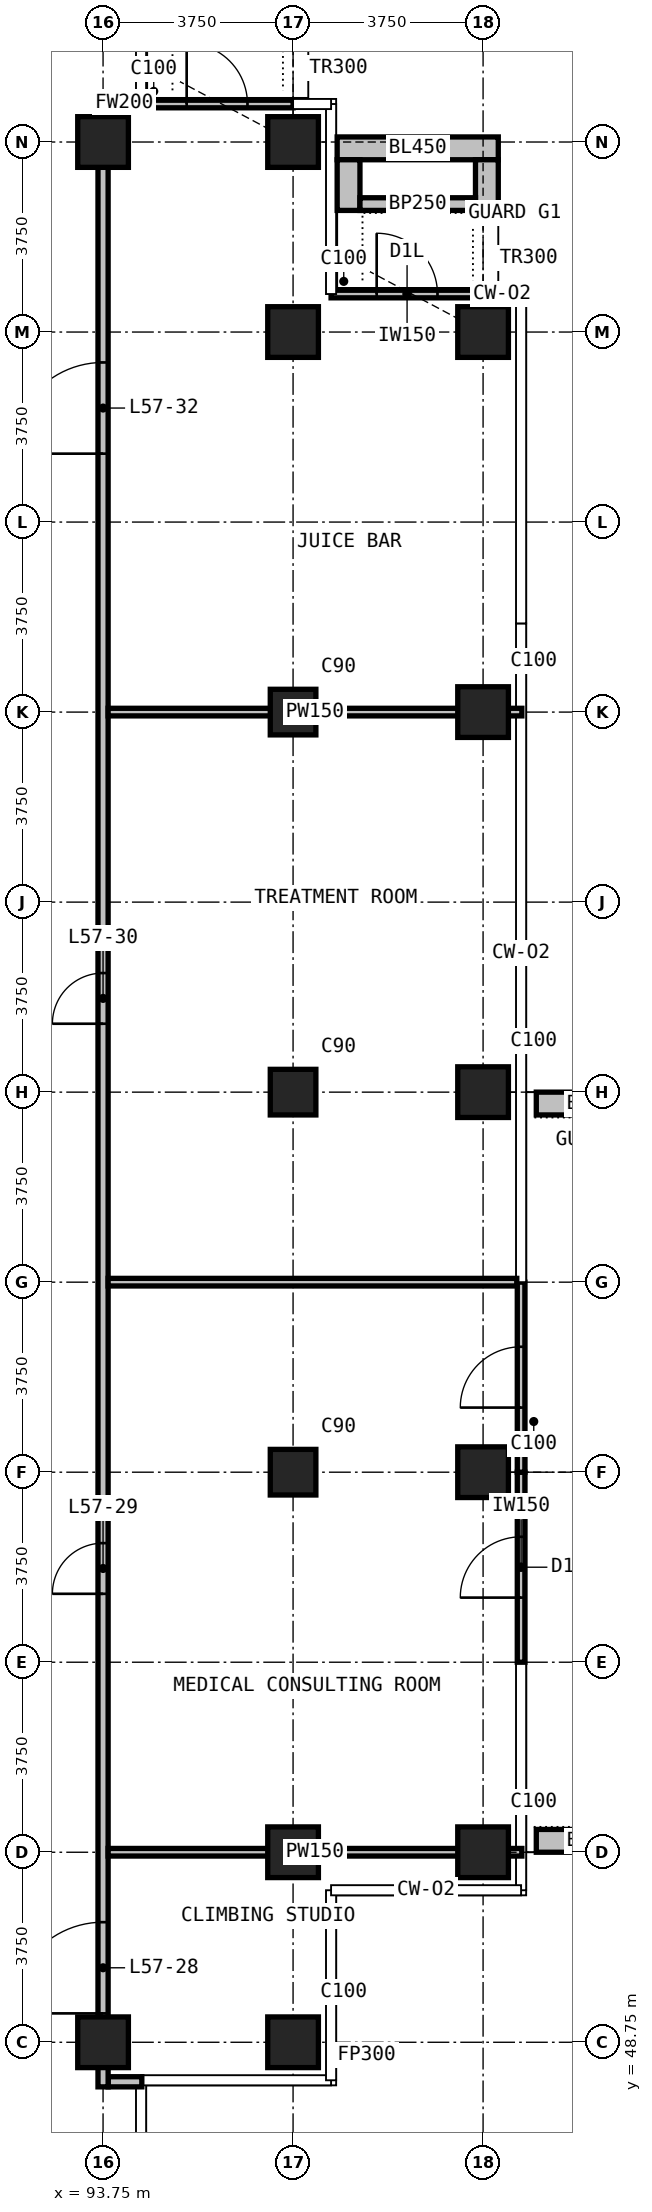
"""IFC4 building model, lengths in metres.
Left out: names, types, materials, properties, quantities, classifications, styles, units other than length and angle.
Written with IfcOpenShell. Run it as: python <this file> out.ifc"""

import sys

from ifc_helpers import new_model, si_unit, direction, frame, frame_2d, origin, origin_2d, place, context, subcontext, project, spatial, rectangle, extrude, element, fill, save


model = new_model("IFC4")
c1 = context("Model", 3, precision=1e-05, world=origin(), true_north=direction((0.0, 1.0)))
c2 = subcontext(c1, "Body", "Model", "MODEL_VIEW")
j1 = project(units=[si_unit("LENGTHUNIT", "METRE"), si_unit("PLANEANGLEUNIT", "RADIAN")], contexts=[c1])
p1 = place(None, origin())
s1 = spatial("IfcSite", under=j1, at=p1, CompositionType="ELEMENT")
p2 = place(p1, origin())
s2 = spatial("IfcBuilding", under=s1, at=p2, CompositionType="ELEMENT")
p3 = place(p2, frame((0.0, 0.0, 221.1)))
s3 = spatial("IfcBuildingStorey", under=s2, at=p3, CompositionType="ELEMENT", Elevation=221.1)
for number, where, z_axis, x_axis in (
    (1, (93.75, 48.75, 0.0), (0.0, 0.0, 1.0), (1.0, 0.0, 0.0)),
    (2, (93.75, 86.25, 0.0), (0.0, 0.0, 1.0), (1.0, 0.0, 0.0)),
    (3, (97.5, 48.75, 0.0), (0.0, 0.0, 1.0), (1.0, 0.0, 0.0)),
    (4, (97.5, 52.5, 0.0), (0.0, 0.0, 1.0), (1.0, 0.0, 0.0)),
):
    element("IfcColumn", number, at=place(p3, frame(where, z_axis=z_axis, x_axis=x_axis)), inside=s3, PredefinedType="COLUMN", context=c2, shape_type="SweptSolid", body=[
        extrude(rectangle(XDim=1.0, YDim=1.0, at=origin_2d()), origin(), (0.0, 0.0, 1.0), 3.6),
    ])
for number, where, z_axis, x_axis in (
    (5, (97.5, 60.0, 0.0), (0.0, 0.0, 1.0), (1.0, 0.0, 0.0)),
    (6, (97.5, 67.5, 0.0), (0.0, 0.0, 1.0), (1.0, 0.0, 0.0)),
    (7, (97.5, 75.0, 0.0), (0.0, 0.0, 1.0), (1.0, 0.0, 0.0)),
):
    element("IfcColumn", number, at=place(p3, frame(where, z_axis=z_axis, x_axis=x_axis)), inside=s3, PredefinedType="COLUMN", context=c2, shape_type="SweptSolid", body=[
        extrude(rectangle(XDim=0.9, YDim=0.9, at=origin_2d()), origin(), (0.0, 0.0, 1.0), 3.6),
    ])
for number, where, z_axis, x_axis in (
    (8, (97.5, 82.5, 0.0), (0.0, 0.0, 1.0), (1.0, 0.0, 0.0)),
    (9, (97.5, 86.25, 0.0), (0.0, 0.0, 1.0), (1.0, 0.0, 0.0)),
    (10, (101.25, 52.5, 0.0), (0.0, 0.0, 1.0), (1.0, 0.0, 0.0)),
    (11, (101.25, 60.0, 0.0), (0.0, 0.0, 1.0), (1.0, 0.0, 0.0)),
    (12, (101.25, 67.5, 0.0), (0.0, 0.0, 1.0), (1.0, 0.0, 0.0)),
    (13, (101.25, 75.0, 0.0), (0.0, 0.0, 1.0), (1.0, 0.0, 0.0)),
    (14, (101.25, 82.5, 0.0), (0.0, 0.0, 1.0), (1.0, 0.0, 0.0)),
):
    element("IfcColumn", number, at=place(p3, frame(where, z_axis=z_axis, x_axis=x_axis)), inside=s3, PredefinedType="COLUMN", context=c2, shape_type="SweptSolid", body=[
        extrude(rectangle(XDim=1.0, YDim=1.0, at=origin_2d()), origin(), (0.0, 0.0, 1.0), 3.6),
    ])
p4 = place(p3, frame((102.0, 56.25, 0.0), z_axis=(0.0, 0.0, 1.0), x_axis=(0.0, 1.0, 0.0)))
e15 = element("IfcWall", 15, at=p4, inside=s3, PredefinedType="SOLIDWALL", context=c2, shape_type="SweptSolid", body=[
    extrude(rectangle(XDim=3.75, YDim=0.15, at=frame_2d((1.875, 0.0))), origin(), (0.0, 0.0, 1.0), 3.3),
])
p5 = place(p4, frame((1.275, 0.0, 0.0)))
e16 = element("IfcOpeningElement", 16, at=p5, cuts=e15, PredefinedType="OPENING", context=c2, shape_type="SweptSolid", body=[
    extrude(rectangle(XDim=1.2, YDim=2.4, at=frame_2d((0.6, 1.2))), frame((0.0, 0.085, 0.0), z_axis=(0.0, -1.0, 0.0), x_axis=(1.0, 0.0, 0.0)), (0.0, 0.0, 1.0), 0.17),
])
p6 = place(p3, frame((102.0, 60.0, 0.0), z_axis=(0.0, 0.0, 1.0), x_axis=(0.0, 1.0, 0.0)))
e17 = element("IfcWall", 17, at=p6, inside=s3, PredefinedType="SOLIDWALL", context=c2, shape_type="SweptSolid", body=[
    extrude(rectangle(XDim=3.75, YDim=0.15, at=frame_2d((1.875, 0.0))), origin(), (0.0, 0.0, 1.0), 3.3),
])
p7 = place(p6, frame((1.275, 0.0, 0.0)))
e18 = element("IfcOpeningElement", 18, at=p7, cuts=e17, PredefinedType="OPENING", context=c2, shape_type="SweptSolid", body=[
    extrude(rectangle(XDim=1.2, YDim=2.4, at=frame_2d((0.6, 1.2))), frame((0.0, 0.085, 0.0), z_axis=(0.0, -1.0, 0.0), x_axis=(1.0, 0.0, 0.0)), (0.0, 0.0, 1.0), 0.17),
])
p8 = place(p3, frame((98.25, 83.25, 0.0), z_axis=(0.0, 0.0, 1.0), x_axis=(1.0, 0.0, 0.0)))
e19 = element("IfcWall", 19, at=p8, inside=s3, PredefinedType="SOLIDWALL", context=c2, shape_type="SweptSolid", body=[
    extrude(rectangle(XDim=3.0, YDim=0.15, at=frame_2d((1.5, 0.0))), origin(), (0.0, 0.0, 1.0), 3.3),
])
p9 = place(p8, frame((0.9, 0.0, 0.0)))
e20 = element("IfcOpeningElement", 20, at=p9, cuts=e19, PredefinedType="OPENING", context=c2, shape_type="SweptSolid", body=[
    extrude(rectangle(XDim=1.2, YDim=2.0, at=frame_2d((0.6, 1.0))), frame((0.0, 0.085, 0.0), z_axis=(0.0, -1.0, 0.0), x_axis=(1.0, 0.0, 0.0)), (0.0, 0.0, 1.0), 0.17),
])
p10 = place(p3, frame((94.5, 87.0, 0.0), z_axis=(0.0, 0.0, 1.0), x_axis=(1.0, 0.0, 0.0)))
e21 = element("IfcWall", 21, at=p10, inside=s3, PredefinedType="SOLIDWALL", context=c2, shape_type="SweptSolid", body=[
    extrude(rectangle(XDim=3.0, YDim=0.15, at=frame_2d((1.5, 0.0))), origin(), (0.0, 0.0, 1.0), 3.3),
])
p11 = place(p10, frame((0.9, 0.0, 0.0)))
e22 = element("IfcOpeningElement", 22, at=p11, cuts=e21, PredefinedType="OPENING", context=c2, shape_type="SweptSolid", body=[
    extrude(rectangle(XDim=1.2, YDim=2.0, at=frame_2d((0.6, 1.0))), frame((0.0, 0.085, 0.0), z_axis=(0.0, -1.0, 0.0), x_axis=(1.0, 0.0, 0.0)), (0.0, 0.0, 1.0), 0.17),
])
for number, where, z_axis, x_axis in (
    (23, (102.3, 52.725, 0.0), (0.0, 0.0, 1.0), (1.0, 0.0, 0.0)),
    (24, (102.3, 67.275, 0.0), (0.0, 0.0, 1.0), (1.0, 0.0, 0.0)),
):
    element("IfcWall", number, at=place(p3, frame(where, z_axis=z_axis, x_axis=x_axis)), inside=s3, PredefinedType="USERDEFINED", context=c2, shape_type="SweptSolid", body=[
        extrude(rectangle(XDim=2.35, YDim=0.45, at=frame_2d((1.175, 0.0))), origin(), (0.0, 0.0, 1.0), 1.1),
    ])
p12 = place(p3, frame((98.37, 86.125, 0.0), z_axis=(0.0, 0.0, 1.0), x_axis=(1.0, 0.0, 0.0)))
e25 = element("IfcWall", 25, at=p12, inside=s3, PredefinedType="USERDEFINED", context=c2, shape_type="SweptSolid", body=[
    extrude(rectangle(XDim=3.18, YDim=0.45, at=frame_2d((1.59, 0.0))), origin(), (0.0, 0.0, 1.0), 1.1),
])
for number, where, z_axis, x_axis in (
    (26, (98.595, 84.9, 0.0), (0.0, 0.0, 1.0), (0.0, 1.0, 0.0)),
    (27, (101.325, 84.9, 0.0), (0.0, 0.0, 1.0), (0.0, 1.0, 0.0)),
):
    element("IfcWall", number, at=place(p3, frame(where, z_axis=z_axis, x_axis=x_axis)), inside=s3, PredefinedType="USERDEFINED", context=c2, shape_type="SweptSolid", body=[
        extrude(rectangle(XDim=1.0, YDim=0.45, at=frame_2d((0.5, 0.0))), origin(), (0.0, 0.0, 1.0), 1.1),
    ])
p13 = place(p3, frame((98.82, 85.025, 0.0), z_axis=(0.0, 0.0, 1.0), x_axis=(1.0, 0.0, 0.0)))
e28 = element("IfcWall", 28, at=p13, inside=s3, PredefinedType="USERDEFINED", context=c2, shape_type="SweptSolid", body=[
    extrude(rectangle(XDim=2.28, YDim=0.25, at=frame_2d((1.14, 0.0))), origin(), (0.0, 0.0, 1.0), 1.0),
])
p14 = place(p3, frame((93.85, 47.97, 0.0), z_axis=(0.0, 0.0, 1.0), x_axis=(1.0, 0.0, 0.0)))
e29 = element("IfcWall", 29, at=p14, inside=s3, PredefinedType="PARTITIONING", context=c2, shape_type="SweptSolid", body=[
    extrude(rectangle(XDim=0.665, YDim=0.2, at=frame_2d((0.333, 0.0))), origin(), (0.0, 0.0, 1.0), 3.3),
])
p15 = place(p3, frame((93.85, 87.03, 0.0), z_axis=(0.0, 0.0, 1.0), x_axis=(1.0, 0.0, 0.0)))
e30 = element("IfcWall", 30, at=p15, inside=s3, PredefinedType="PARTITIONING", context=c2, shape_type="SweptSolid", body=[
    extrude(rectangle(XDim=0.64, YDim=0.2, at=frame_2d((0.32, 0.0))), origin(), (0.0, 0.0, 1.0), 3.3),
])
p16 = place(p3, frame((93.75, 47.87, 0.0), z_axis=(0.0, 0.0, 1.0), x_axis=(0.0, 1.0, 0.0)))
e31 = element("IfcWall", 31, at=p16, inside=s3, PredefinedType="PARTITIONING", context=c2, shape_type="SweptSolid", body=[
    extrude(rectangle(XDim=39.26, YDim=0.2, at=frame_2d((19.63, 0.0))), origin(), (0.0, 0.0, 1.0), 3.3),
])
p17 = place(p16, frame((1.45, 0.0, 0.0)))
e32 = element("IfcOpeningElement", 32, at=p17, cuts=e31, PredefinedType="OPENING", context=c2, shape_type="SweptSolid", body=[
    extrude(rectangle(XDim=1.8, YDim=2.2, at=frame_2d((0.9, 1.1))), frame((0.0, 0.11, 0.0), z_axis=(0.0, -1.0, 0.0), x_axis=(1.0, 0.0, 0.0)), (0.0, 0.0, 1.0), 0.22),
])
p18 = place(p16, frame((9.73, 0.0, 0.0)))
e33 = element("IfcOpeningElement", 33, at=p18, cuts=e31, PredefinedType="OPENING", context=c2, shape_type="SweptSolid", body=[
    extrude(rectangle(XDim=1.0, YDim=2.2, at=frame_2d((0.5, 1.1))), frame((0.0, 0.11, 0.0), z_axis=(0.0, -1.0, 0.0), x_axis=(1.0, 0.0, 0.0)), (0.0, 0.0, 1.0), 0.22),
])
p19 = place(p16, frame((20.98, 0.0, 0.0)))
e34 = element("IfcOpeningElement", 34, at=p19, cuts=e31, PredefinedType="OPENING", context=c2, shape_type="SweptSolid", body=[
    extrude(rectangle(XDim=1.0, YDim=2.2, at=frame_2d((0.5, 1.1))), frame((0.0, 0.11, 0.0), z_axis=(0.0, -1.0, 0.0), x_axis=(1.0, 0.0, 0.0)), (0.0, 0.0, 1.0), 0.22),
])
p20 = place(p16, frame((32.23, 0.0, 0.0)))
e35 = element("IfcOpeningElement", 35, at=p20, cuts=e31, PredefinedType="OPENING", context=c2, shape_type="SweptSolid", body=[
    extrude(rectangle(XDim=1.8, YDim=2.2, at=frame_2d((0.9, 1.1))), frame((0.0, 0.11, 0.0), z_axis=(0.0, -1.0, 0.0), x_axis=(1.0, 0.0, 0.0)), (0.0, 0.0, 1.0), 0.22),
])
p21 = place(p3, frame((93.85, 52.5, 0.0), z_axis=(0.0, 0.0, 1.0), x_axis=(1.0, 0.0, 0.0)))
e36 = element("IfcWall", 36, at=p21, inside=s3, PredefinedType="PARTITIONING", context=c2, shape_type="SweptSolid", body=[
    extrude(rectangle(XDim=8.165, YDim=0.15, at=frame_2d((4.083, 0.0))), origin(), (0.0, 0.0, 1.0), 3.3),
])
p22 = place(p3, frame((93.85, 63.75, 0.0), z_axis=(0.0, 0.0, 1.0), x_axis=(1.0, 0.0, 0.0)))
e37 = element("IfcWall", 37, at=p22, inside=s3, PredefinedType="PARTITIONING", context=c2, shape_type="SweptSolid", body=[
    extrude(rectangle(XDim=8.065, YDim=0.15, at=frame_2d((4.032, 0.0))), origin(), (0.0, 0.0, 1.0), 3.3),
])
p23 = place(p3, frame((93.85, 75.0, 0.0), z_axis=(0.0, 0.0, 1.0), x_axis=(1.0, 0.0, 0.0)))
e38 = element("IfcWall", 38, at=p23, inside=s3, PredefinedType="PARTITIONING", context=c2, shape_type="SweptSolid", body=[
    extrude(rectangle(XDim=8.165, YDim=0.15, at=frame_2d((4.083, 0.0))), origin(), (0.0, 0.0, 1.0), 3.3),
])
p24 = place(p5, origin())
e39 = element("IfcDoor", 39, at=p24, inside=s3, OperationType="SINGLE_SWING_LEFT", PredefinedType="DOOR", context=c2, shape_type="SweptSolid", body=[
    extrude(rectangle(XDim=1.2, YDim=2.4, at=frame_2d((0.6, 1.2))), frame((0.0, 0.025, 0.0), z_axis=(0.0, -1.0, 0.0), x_axis=(1.0, 0.0, 0.0)), (0.0, 0.0, 1.0), 0.05),
])
fill(e16, e39)
p25 = place(p7, origin())
e40 = element("IfcDoor", 40, at=p25, inside=s3, OperationType="SINGLE_SWING_LEFT", PredefinedType="DOOR", context=c2, shape_type="SweptSolid", body=[
    extrude(rectangle(XDim=1.2, YDim=2.4, at=frame_2d((0.6, 1.2))), frame((0.0, 0.025, 0.0), z_axis=(0.0, -1.0, 0.0), x_axis=(1.0, 0.0, 0.0)), (0.0, 0.0, 1.0), 0.05),
])
fill(e18, e40)
p26 = place(p9, origin())
e41 = element("IfcDoor", 41, at=p26, inside=s3, OperationType="SINGLE_SWING_LEFT", PredefinedType="DOOR", context=c2, shape_type="SweptSolid", body=[
    extrude(rectangle(XDim=1.2, YDim=2.0, at=frame_2d((0.6, 1.0))), frame((0.0, 0.025, 0.0), z_axis=(0.0, -1.0, 0.0), x_axis=(1.0, 0.0, 0.0)), (0.0, 0.0, 1.0), 0.05),
])
fill(e20, e41)
p27 = place(p11, origin())
e42 = element("IfcDoor", 42, at=p27, inside=s3, OperationType="SINGLE_SWING_LEFT", PredefinedType="DOOR", context=c2, shape_type="SweptSolid", body=[
    extrude(rectangle(XDim=1.2, YDim=2.0, at=frame_2d((0.6, 1.0))), frame((0.0, 0.025, 0.0), z_axis=(0.0, -1.0, 0.0), x_axis=(1.0, 0.0, 0.0)), (0.0, 0.0, 1.0), 0.05),
])
fill(e22, e42)
p28 = place(p17, origin())
e43 = element("IfcDoor", 43, at=p28, inside=s3, OperationType="DOUBLE_DOOR_SINGLE_SWING", PredefinedType="DOOR", context=c2, shape_type="SweptSolid", body=[
    extrude(rectangle(XDim=1.8, YDim=2.2, at=frame_2d((0.9, 1.1))), frame((0.0, 0.025, 0.0), z_axis=(0.0, -1.0, 0.0), x_axis=(1.0, 0.0, 0.0)), (0.0, 0.0, 1.0), 0.05),
])
fill(e32, e43)
p29 = place(p18, origin())
e44 = element("IfcDoor", 44, at=p29, inside=s3, OperationType="SINGLE_SWING_RIGHT", PredefinedType="DOOR", context=c2, shape_type="SweptSolid", body=[
    extrude(rectangle(XDim=1.0, YDim=2.2, at=frame_2d((0.5, 1.1))), frame((0.0, 0.025, 0.0), z_axis=(0.0, -1.0, 0.0), x_axis=(1.0, 0.0, 0.0)), (0.0, 0.0, 1.0), 0.05),
])
fill(e33, e44)
p30 = place(p19, origin())
e45 = element("IfcDoor", 45, at=p30, inside=s3, OperationType="SINGLE_SWING_RIGHT", PredefinedType="DOOR", context=c2, shape_type="SweptSolid", body=[
    extrude(rectangle(XDim=1.0, YDim=2.2, at=frame_2d((0.5, 1.1))), frame((0.0, 0.025, 0.0), z_axis=(0.0, -1.0, 0.0), x_axis=(1.0, 0.0, 0.0)), (0.0, 0.0, 1.0), 0.05),
])
fill(e34, e45)
p31 = place(p20, origin())
e46 = element("IfcDoor", 46, at=p31, inside=s3, OperationType="DOUBLE_DOOR_SINGLE_SWING", PredefinedType="DOOR", context=c2, shape_type="SweptSolid", body=[
    extrude(rectangle(XDim=1.8, YDim=2.2, at=frame_2d((0.9, 1.1))), frame((0.0, 0.025, 0.0), z_axis=(0.0, -1.0, 0.0), x_axis=(1.0, 0.0, 0.0)), (0.0, 0.0, 1.0), 0.05),
])
fill(e35, e46)
save(model, sys.argv[1])
